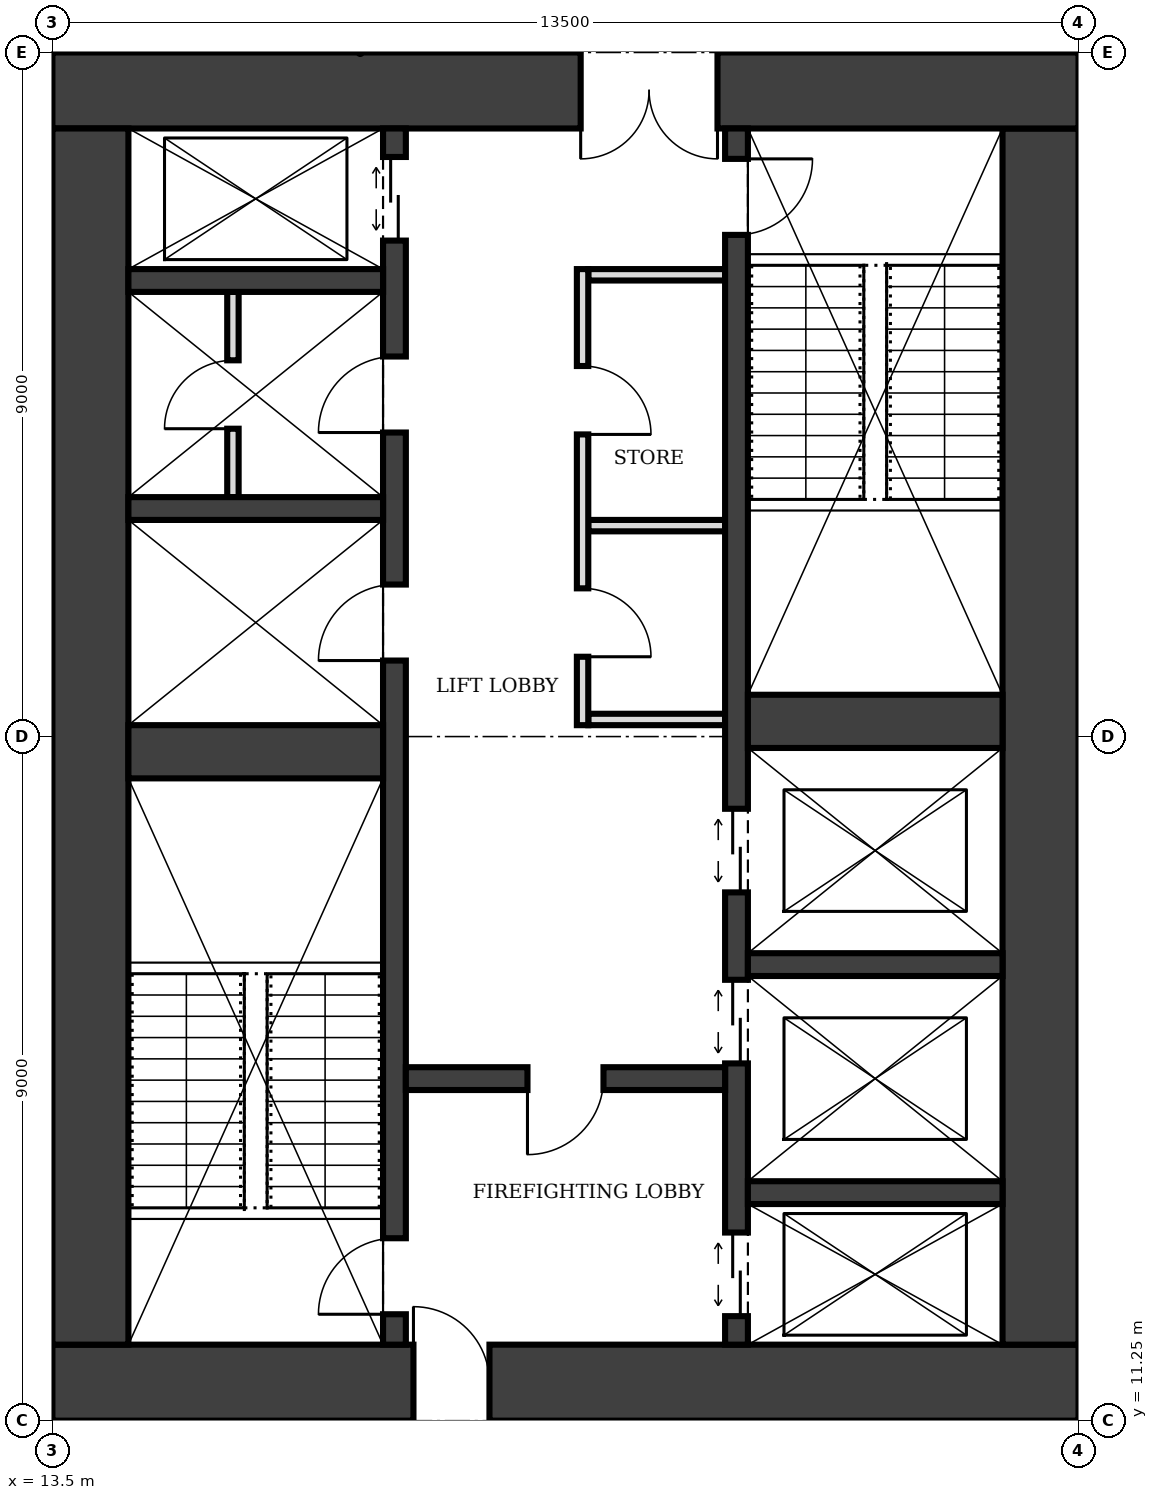
"""IFC4 building model, lengths in metres.
Left out: names, types, materials, properties, quantities, classifications, styles, units other than length and angle.
Written with IfcOpenShell. Run it as: python <this file> out.ifc"""

import sys

from ifc_helpers import new_model, si_unit, direction, frame, frame_2d, origin, place, context, subcontext, project, spatial, rectangle, extrude, element, fill, save


model = new_model("IFC4")
c1 = context("Model", 3, precision=1e-05, world=origin(), true_north=direction((0.0, 1.0)))
c2 = subcontext(c1, "Body", "Model", "MODEL_VIEW")
j1 = project(units=[si_unit("LENGTHUNIT", "METRE"), si_unit("PLANEANGLEUNIT", "RADIAN")], contexts=[c1])
p1 = place(None, origin())
s1 = spatial("IfcSite", under=j1, at=p1, CompositionType="ELEMENT")
p2 = place(p1, origin())
s2 = spatial("IfcBuilding", under=s1, at=p2, CompositionType="ELEMENT")
p3 = place(p2, frame((0.0, 0.0, 113.0)))
s3 = spatial("IfcBuildingStorey", under=s2, at=p3, CompositionType="ELEMENT", Elevation=113.0)
p4 = place(p3, frame((13.5, 11.75, 0.0), z_axis=(0.0, 0.0, 1.0), x_axis=(1.0, 0.0, 0.0)))
e1 = element("IfcWall", 1, at=p4, inside=s3, PredefinedType="SHEAR", context=c2, shape_type="SweptSolid", body=[
    extrude(rectangle(XDim=13.5, YDim=1.0, at=frame_2d((6.75, 0.0))), origin(), (0.0, 0.0, 1.0), 4.0),
])
p5 = place(p4, frame((4.75, 0.0, 0.0)))
e2 = element("IfcOpeningElement", 2, at=p5, cuts=e1, PredefinedType="OPENING", context=c2, shape_type="SweptSolid", body=[
    extrude(rectangle(XDim=1.0, YDim=2.1, at=frame_2d((0.5, 1.05))), frame((0.0, 0.51, 0.0), z_axis=(0.0, -1.0, 0.0), x_axis=(1.0, 0.0, 0.0)), (0.0, 0.0, 1.0), 1.02),
])
p6 = place(p3, frame((26.5, 12.25, 0.0), z_axis=(0.0, 0.0, 1.0), x_axis=(0.0, 1.0, 0.0)))
e3 = element("IfcWall", 3, at=p6, inside=s3, PredefinedType="SHEAR", context=c2, shape_type="SweptSolid", body=[
    extrude(rectangle(XDim=16.0, YDim=1.0, at=frame_2d((8.0, 0.0))), origin(), (0.0, 0.0, 1.0), 4.0),
])
p7 = place(p3, frame((27.0, 28.75, 0.0), z_axis=(0.0, 0.0, 1.0), x_axis=(-1.0, 0.0, 0.0)))
e4 = element("IfcWall", 4, at=p7, inside=s3, PredefinedType="SHEAR", context=c2, shape_type="SweptSolid", body=[
    extrude(rectangle(XDim=13.5, YDim=1.0, at=frame_2d((6.75, 0.0))), origin(), (0.0, 0.0, 1.0), 4.0),
])
p8 = place(p7, frame((4.75, 0.0, 0.0)))
e5 = element("IfcOpeningElement", 5, at=p8, cuts=e4, PredefinedType="OPENING", context=c2, shape_type="SweptSolid", body=[
    extrude(rectangle(XDim=1.8, YDim=2.1, at=frame_2d((0.9, 1.05))), frame((0.0, 0.51, 0.0), z_axis=(0.0, -1.0, 0.0), x_axis=(1.0, 0.0, 0.0)), (0.0, 0.0, 1.0), 1.02),
])
p9 = place(p3, frame((14.0, 28.25, 0.0), z_axis=(0.0, 0.0, 1.0), x_axis=(0.0, -1.0, 0.0)))
e6 = element("IfcWall", 6, at=p9, inside=s3, PredefinedType="SHEAR", context=c2, shape_type="SweptSolid", body=[
    extrude(rectangle(XDim=16.0, YDim=1.0, at=frame_2d((8.0, 0.0))), origin(), (0.0, 0.0, 1.0), 4.0),
])
p10 = place(p3, frame((18.0, 12.25, 0.0), z_axis=(0.0, 0.0, 1.0), x_axis=(0.0, 1.0, 0.0)))
e7 = element("IfcWall", 7, at=p10, inside=s3, PredefinedType="SHEAR", context=c2, shape_type="SweptSolid", body=[
    extrude(rectangle(XDim=16.0, YDim=0.3, at=frame_2d((8.0, 0.0))), origin(), (0.0, 0.0, 1.0), 4.0),
])
p11 = place(p10, frame((0.4, 0.0, 0.0)))
e8 = element("IfcOpeningElement", 8, at=p11, cuts=e7, PredefinedType="OPENING", context=c2, shape_type="SweptSolid", body=[
    extrude(rectangle(XDim=1.0, YDim=2.1, at=frame_2d((0.5, 1.05))), frame((0.0, 0.16, 0.0), z_axis=(0.0, -1.0, 0.0), x_axis=(1.0, 0.0, 0.0)), (0.0, 0.0, 1.0), 0.32),
])
p12 = place(p10, frame((14.525, 0.0, 0.0)))
e9 = element("IfcOpeningElement", 9, at=p12, cuts=e7, PredefinedType="OPENING", context=c2, shape_type="SweptSolid", body=[
    extrude(rectangle(XDim=1.1, YDim=2.1, at=frame_2d((0.55, 1.05))), frame((0.0, 0.16, 0.0), z_axis=(0.0, -1.0, 0.0), x_axis=(1.0, 0.0, 0.0)), (0.0, 0.0, 1.0), 0.32),
])
p13 = place(p10, frame((9.0, 0.0, 0.0)))
e10 = element("IfcOpeningElement", 10, at=p13, cuts=e7, PredefinedType="OPENING", context=c2, shape_type="SweptSolid", body=[
    extrude(rectangle(XDim=1.0, YDim=2.1, at=frame_2d((0.5, 1.05))), frame((0.0, 0.16, 0.0), z_axis=(0.0, -1.0, 0.0), x_axis=(1.0, 0.0, 0.0)), (0.0, 0.0, 1.0), 0.32),
])
p14 = place(p10, frame((12.0, 0.0, 0.0)))
e11 = element("IfcOpeningElement", 11, at=p14, cuts=e7, PredefinedType="OPENING", context=c2, shape_type="SweptSolid", body=[
    extrude(rectangle(XDim=1.0, YDim=2.1, at=frame_2d((0.5, 1.05))), frame((0.0, 0.16, 0.0), z_axis=(0.0, -1.0, 0.0), x_axis=(1.0, 0.0, 0.0)), (0.0, 0.0, 1.0), 0.32),
])
p15 = place(p3, frame((22.5, 12.25, 0.0), z_axis=(0.0, 0.0, 1.0), x_axis=(0.0, 1.0, 0.0)))
e12 = element("IfcWall", 12, at=p15, inside=s3, PredefinedType="SHEAR", context=c2, shape_type="SweptSolid", body=[
    extrude(rectangle(XDim=16.0, YDim=0.3, at=frame_2d((8.0, 0.0))), origin(), (0.0, 0.0, 1.0), 4.0),
])
p16 = place(p15, frame((14.6, 0.0, 0.0)))
e13 = element("IfcOpeningElement", 13, at=p16, cuts=e12, PredefinedType="OPENING", context=c2, shape_type="SweptSolid", body=[
    extrude(rectangle(XDim=1.0, YDim=2.1, at=frame_2d((0.5, 1.05))), frame((0.0, 0.16, 0.0), z_axis=(0.0, -1.0, 0.0), x_axis=(1.0, 0.0, 0.0)), (0.0, 0.0, 1.0), 0.32),
])
p17 = place(p15, frame((0.375, 0.0, 0.0)))
e14 = element("IfcOpeningElement", 14, at=p17, cuts=e12, PredefinedType="OPENING", context=c2, shape_type="SweptSolid", body=[
    extrude(rectangle(XDim=1.1, YDim=2.1, at=frame_2d((0.55, 1.05))), frame((0.0, 0.16, 0.0), z_axis=(0.0, -1.0, 0.0), x_axis=(1.0, 0.0, 0.0)), (0.0, 0.0, 1.0), 0.32),
])
p18 = place(p15, frame((3.7, 0.0, 0.0)))
e15 = element("IfcOpeningElement", 15, at=p18, cuts=e12, PredefinedType="OPENING", context=c2, shape_type="SweptSolid", body=[
    extrude(rectangle(XDim=1.1, YDim=2.1, at=frame_2d((0.55, 1.05))), frame((0.0, 0.16, 0.0), z_axis=(0.0, -1.0, 0.0), x_axis=(1.0, 0.0, 0.0)), (0.0, 0.0, 1.0), 0.32),
])
p19 = place(p15, frame((5.95, 0.0, 0.0)))
e16 = element("IfcOpeningElement", 16, at=p19, cuts=e12, PredefinedType="OPENING", context=c2, shape_type="SweptSolid", body=[
    extrude(rectangle(XDim=1.1, YDim=2.1, at=frame_2d((0.55, 1.05))), frame((0.0, 0.16, 0.0), z_axis=(0.0, -1.0, 0.0), x_axis=(1.0, 0.0, 0.0)), (0.0, 0.0, 1.0), 0.32),
])
p20 = place(p3, frame((14.5, 20.05, 0.0), z_axis=(0.0, 0.0, 1.0), x_axis=(1.0, 0.0, 0.0)))
e17 = element("IfcWall", 17, at=p20, inside=s3, PredefinedType="SHEAR", context=c2, shape_type="SweptSolid", body=[
    extrude(rectangle(XDim=3.35, YDim=0.7, at=frame_2d((1.675, 0.0))), origin(), (0.0, 0.0, 1.0), 4.0),
])
p21 = place(p3, frame((18.15, 15.75, 0.0), z_axis=(0.0, 0.0, 1.0), x_axis=(1.0, 0.0, 0.0)))
e18 = element("IfcWall", 18, at=p21, inside=s3, PredefinedType="SHEAR", context=c2, shape_type="SweptSolid", body=[
    extrude(rectangle(XDim=4.2, YDim=0.3, at=frame_2d((2.1, 0.0))), origin(), (0.0, 0.0, 1.0), 4.0),
])
p22 = place(p21, frame((1.6, 0.0, 0.0)))
e19 = element("IfcOpeningElement", 19, at=p22, cuts=e18, PredefinedType="OPENING", context=c2, shape_type="SweptSolid", body=[
    extrude(rectangle(XDim=1.0, YDim=2.1, at=frame_2d((0.5, 1.05))), frame((0.0, 0.16, 0.0), z_axis=(0.0, -1.0, 0.0), x_axis=(1.0, 0.0, 0.0)), (0.0, 0.0, 1.0), 0.32),
])
for number, where, z_axis, x_axis in (
    (20, (22.65, 14.25, 0.0), (0.0, 0.0, 1.0), (1.0, 0.0, 0.0)),
    (21, (22.65, 17.25, 0.0), (0.0, 0.0, 1.0), (1.0, 0.0, 0.0)),
):
    element("IfcWall", number, at=place(p3, frame(where, z_axis=z_axis, x_axis=x_axis)), inside=s3, PredefinedType="SHEAR", context=c2, shape_type="SweptSolid", body=[
        extrude(rectangle(XDim=3.35, YDim=0.3, at=frame_2d((1.675, 0.0))), origin(), (0.0, 0.0, 1.0), 4.0),
    ])
p23 = place(p3, frame((22.65, 20.45, 0.0), z_axis=(0.0, 0.0, 1.0), x_axis=(1.0, 0.0, 0.0)))
e22 = element("IfcWall", 22, at=p23, inside=s3, PredefinedType="SHEAR", context=c2, shape_type="SweptSolid", body=[
    extrude(rectangle(XDim=3.35, YDim=0.7, at=frame_2d((1.675, 0.0))), origin(), (0.0, 0.0, 1.0), 4.0),
])
for number, where, z_axis, x_axis in (
    (23, (14.5, 23.25, 0.0), (0.0, 0.0, 1.0), (1.0, 0.0, 0.0)),
    (24, (14.5, 26.25, 0.0), (0.0, 0.0, 1.0), (1.0, 0.0, 0.0)),
):
    element("IfcWall", number, at=place(p3, frame(where, z_axis=z_axis, x_axis=x_axis)), inside=s3, PredefinedType="SHEAR", context=c2, shape_type="SweptSolid", body=[
        extrude(rectangle(XDim=3.35, YDim=0.3, at=frame_2d((1.675, 0.0))), origin(), (0.0, 0.0, 1.0), 4.0),
    ])
p24 = place(p3, frame((20.475, 20.4, 0.0), z_axis=(0.0, 0.0, 1.0), x_axis=(0.0, 1.0, 0.0)))
e25 = element("IfcWall", 25, at=p24, inside=s3, PredefinedType="PARTITIONING", context=c2, shape_type="SweptSolid", body=[
    extrude(rectangle(XDim=6.0, YDim=0.15, at=frame_2d((3.0, 0.0))), origin(), (0.0, 0.0, 1.0), 3.75),
])
p25 = place(p24, frame((0.9, 0.0, 0.0)))
e26 = element("IfcOpeningElement", 26, at=p25, cuts=e25, PredefinedType="OPENING", context=c2, shape_type="SweptSolid", body=[
    extrude(rectangle(XDim=0.9, YDim=2.1, at=frame_2d((0.45, 1.05))), frame((0.0, 0.085, 0.0), z_axis=(0.0, -1.0, 0.0), x_axis=(1.0, 0.0, 0.0)), (0.0, 0.0, 1.0), 0.17),
])
p26 = place(p24, frame((3.825, 0.0, 0.0)))
e27 = element("IfcOpeningElement", 27, at=p26, cuts=e25, PredefinedType="OPENING", context=c2, shape_type="SweptSolid", body=[
    extrude(rectangle(XDim=0.9, YDim=2.1, at=frame_2d((0.45, 1.05))), frame((0.0, 0.085, 0.0), z_axis=(0.0, -1.0, 0.0), x_axis=(1.0, 0.0, 0.0)), (0.0, 0.0, 1.0), 0.17),
])
for number, where, z_axis, x_axis in (
    (28, (20.55, 20.475, 0.0), (0.0, 0.0, 1.0), (1.0, 0.0, 0.0)),
    (29, (20.55, 23.025, 0.0), (0.0, 0.0, 1.0), (1.0, 0.0, 0.0)),
    (30, (20.55, 26.325, 0.0), (0.0, 0.0, 1.0), (1.0, 0.0, 0.0)),
):
    element("IfcWall", number, at=place(p3, frame(where, z_axis=z_axis, x_axis=x_axis)), inside=s3, PredefinedType="PARTITIONING", context=c2, shape_type="SweptSolid", body=[
        extrude(rectangle(XDim=1.8, YDim=0.15, at=frame_2d((0.9, 0.0))), origin(), (0.0, 0.0, 1.0), 3.75),
    ])
p27 = place(p3, frame((15.875, 23.4, 0.0), z_axis=(0.0, 0.0, 1.0), x_axis=(0.0, 1.0, 0.0)))
e31 = element("IfcWall", 31, at=p27, inside=s3, PredefinedType="PARTITIONING", context=c2, shape_type="SweptSolid", body=[
    extrude(rectangle(XDim=2.7, YDim=0.15, at=frame_2d((1.35, 0.0))), origin(), (0.0, 0.0, 1.0), 3.75),
])
p28 = place(p27, frame((0.9, 0.0, 0.0)))
e32 = element("IfcOpeningElement", 32, at=p28, cuts=e31, PredefinedType="OPENING", context=c2, shape_type="SweptSolid", body=[
    extrude(rectangle(XDim=0.9, YDim=2.1, at=frame_2d((0.45, 1.05))), frame((0.0, 0.085, 0.0), z_axis=(0.0, -1.0, 0.0), x_axis=(1.0, 0.0, 0.0)), (0.0, 0.0, 1.0), 0.17),
])
p29 = place(p5, origin())
e33 = element("IfcDoor", 33, at=p29, inside=s3, OperationType="SINGLE_SWING_LEFT", PredefinedType="DOOR", context=c2, shape_type="SweptSolid", body=[
    extrude(rectangle(XDim=1.0, YDim=2.1, at=frame_2d((0.5, 1.05))), frame((0.0, 0.025, 0.0), z_axis=(0.0, -1.0, 0.0), x_axis=(1.0, 0.0, 0.0)), (0.0, 0.0, 1.0), 0.05),
])
fill(e2, e33)
p30 = place(p8, origin())
e34 = element("IfcDoor", 34, at=p30, inside=s3, OperationType="DOUBLE_DOOR_SINGLE_SWING", PredefinedType="DOOR", context=c2, shape_type="SweptSolid", body=[
    extrude(rectangle(XDim=1.8, YDim=2.1, at=frame_2d((0.9, 1.05))), frame((0.0, 0.025, 0.0), z_axis=(0.0, -1.0, 0.0), x_axis=(1.0, 0.0, 0.0)), (0.0, 0.0, 1.0), 0.05),
])
fill(e5, e34)
p31 = place(p22, frame((1.0, 0.0, 0.0), z_axis=(0.0, 0.0, 1.0), x_axis=(-1.0, 0.0, 0.0)))
e35 = element("IfcDoor", 35, at=p31, inside=s3, OperationType="SINGLE_SWING_RIGHT", PredefinedType="DOOR", context=c2, shape_type="SweptSolid", body=[
    extrude(rectangle(XDim=1.0, YDim=2.1, at=frame_2d((0.5, 1.05))), frame((0.0, 0.025, 0.0), z_axis=(0.0, -1.0, 0.0), x_axis=(1.0, 0.0, 0.0)), (0.0, 0.0, 1.0), 0.05),
])
fill(e19, e35)
p32 = place(p11, origin())
e36 = element("IfcDoor", 36, at=p32, inside=s3, OperationType="SINGLE_SWING_LEFT", PredefinedType="DOOR", context=c2, shape_type="SweptSolid", body=[
    extrude(rectangle(XDim=1.0, YDim=2.1, at=frame_2d((0.5, 1.05))), frame((0.0, 0.025, 0.0), z_axis=(0.0, -1.0, 0.0), x_axis=(1.0, 0.0, 0.0)), (0.0, 0.0, 1.0), 0.05),
])
fill(e8, e36)
p33 = place(p16, frame((1.0, 0.0, 0.0), z_axis=(0.0, 0.0, 1.0), x_axis=(-1.0, 0.0, 0.0)))
e37 = element("IfcDoor", 37, at=p33, inside=s3, OperationType="SINGLE_SWING_LEFT", PredefinedType="DOOR", context=c2, shape_type="SweptSolid", body=[
    extrude(rectangle(XDim=1.0, YDim=2.1, at=frame_2d((0.5, 1.05))), frame((0.0, 0.025, 0.0), z_axis=(0.0, -1.0, 0.0), x_axis=(1.0, 0.0, 0.0)), (0.0, 0.0, 1.0), 0.05),
])
fill(e13, e37)
p34 = place(p17, origin())
e38 = element("IfcDoor", 38, at=p34, inside=s3, OperationType="DOUBLE_DOOR_SLIDING", PredefinedType="DOOR", context=c2, shape_type="SweptSolid", body=[
    extrude(rectangle(XDim=1.1, YDim=2.1, at=frame_2d((0.55, 1.05))), frame((0.0, 0.025, 0.0), z_axis=(0.0, -1.0, 0.0), x_axis=(1.0, 0.0, 0.0)), (0.0, 0.0, 1.0), 0.05),
])
fill(e14, e38)
p35 = place(p12, origin())
e39 = element("IfcDoor", 39, at=p35, inside=s3, OperationType="DOUBLE_DOOR_SLIDING", PredefinedType="DOOR", context=c2, shape_type="SweptSolid", body=[
    extrude(rectangle(XDim=1.1, YDim=2.1, at=frame_2d((0.55, 1.05))), frame((0.0, 0.025, 0.0), z_axis=(0.0, -1.0, 0.0), x_axis=(1.0, 0.0, 0.0)), (0.0, 0.0, 1.0), 0.05),
])
fill(e9, e39)
p36 = place(p18, origin())
e40 = element("IfcDoor", 40, at=p36, inside=s3, OperationType="DOUBLE_DOOR_SLIDING", PredefinedType="DOOR", context=c2, shape_type="SweptSolid", body=[
    extrude(rectangle(XDim=1.1, YDim=2.1, at=frame_2d((0.55, 1.05))), frame((0.0, 0.025, 0.0), z_axis=(0.0, -1.0, 0.0), x_axis=(1.0, 0.0, 0.0)), (0.0, 0.0, 1.0), 0.05),
])
fill(e15, e40)
p37 = place(p19, origin())
e41 = element("IfcDoor", 41, at=p37, inside=s3, OperationType="DOUBLE_DOOR_SLIDING", PredefinedType="DOOR", context=c2, shape_type="SweptSolid", body=[
    extrude(rectangle(XDim=1.1, YDim=2.1, at=frame_2d((0.55, 1.05))), frame((0.0, 0.025, 0.0), z_axis=(0.0, -1.0, 0.0), x_axis=(1.0, 0.0, 0.0)), (0.0, 0.0, 1.0), 0.05),
])
fill(e16, e41)
p38 = place(p25, frame((0.9, 0.0, 0.0), z_axis=(0.0, 0.0, 1.0), x_axis=(-1.0, 0.0, 0.0)))
e42 = element("IfcDoor", 42, at=p38, inside=s3, OperationType="SINGLE_SWING_RIGHT", PredefinedType="DOOR", context=c2, shape_type="SweptSolid", body=[
    extrude(rectangle(XDim=0.9, YDim=2.1, at=frame_2d((0.45, 1.05))), frame((0.0, 0.025, 0.0), z_axis=(0.0, -1.0, 0.0), x_axis=(1.0, 0.0, 0.0)), (0.0, 0.0, 1.0), 0.05),
])
fill(e26, e42)
p39 = place(p26, frame((0.9, 0.0, 0.0), z_axis=(0.0, 0.0, 1.0), x_axis=(-1.0, 0.0, 0.0)))
e43 = element("IfcDoor", 43, at=p39, inside=s3, OperationType="SINGLE_SWING_RIGHT", PredefinedType="DOOR", context=c2, shape_type="SweptSolid", body=[
    extrude(rectangle(XDim=0.9, YDim=2.1, at=frame_2d((0.45, 1.05))), frame((0.0, 0.025, 0.0), z_axis=(0.0, -1.0, 0.0), x_axis=(1.0, 0.0, 0.0)), (0.0, 0.0, 1.0), 0.05),
])
fill(e27, e43)
p40 = place(p13, origin())
e44 = element("IfcDoor", 44, at=p40, inside=s3, OperationType="SINGLE_SWING_LEFT", PredefinedType="DOOR", context=c2, shape_type="SweptSolid", body=[
    extrude(rectangle(XDim=1.0, YDim=2.1, at=frame_2d((0.5, 1.05))), frame((0.0, 0.025, 0.0), z_axis=(0.0, -1.0, 0.0), x_axis=(1.0, 0.0, 0.0)), (0.0, 0.0, 1.0), 0.05),
])
fill(e10, e44)
p41 = place(p14, origin())
e45 = element("IfcDoor", 45, at=p41, inside=s3, OperationType="SINGLE_SWING_LEFT", PredefinedType="DOOR", context=c2, shape_type="SweptSolid", body=[
    extrude(rectangle(XDim=1.0, YDim=2.1, at=frame_2d((0.5, 1.05))), frame((0.0, 0.025, 0.0), z_axis=(0.0, -1.0, 0.0), x_axis=(1.0, 0.0, 0.0)), (0.0, 0.0, 1.0), 0.05),
])
fill(e11, e45)
p42 = place(p28, origin())
e46 = element("IfcDoor", 46, at=p42, inside=s3, OperationType="SINGLE_SWING_LEFT", PredefinedType="DOOR", context=c2, shape_type="SweptSolid", body=[
    extrude(rectangle(XDim=0.9, YDim=2.1, at=frame_2d((0.45, 1.05))), frame((0.0, 0.025, 0.0), z_axis=(0.0, -1.0, 0.0), x_axis=(1.0, 0.0, 0.0)), (0.0, 0.0, 1.0), 0.05),
])
fill(e32, e46)
save(model, sys.argv[1])
